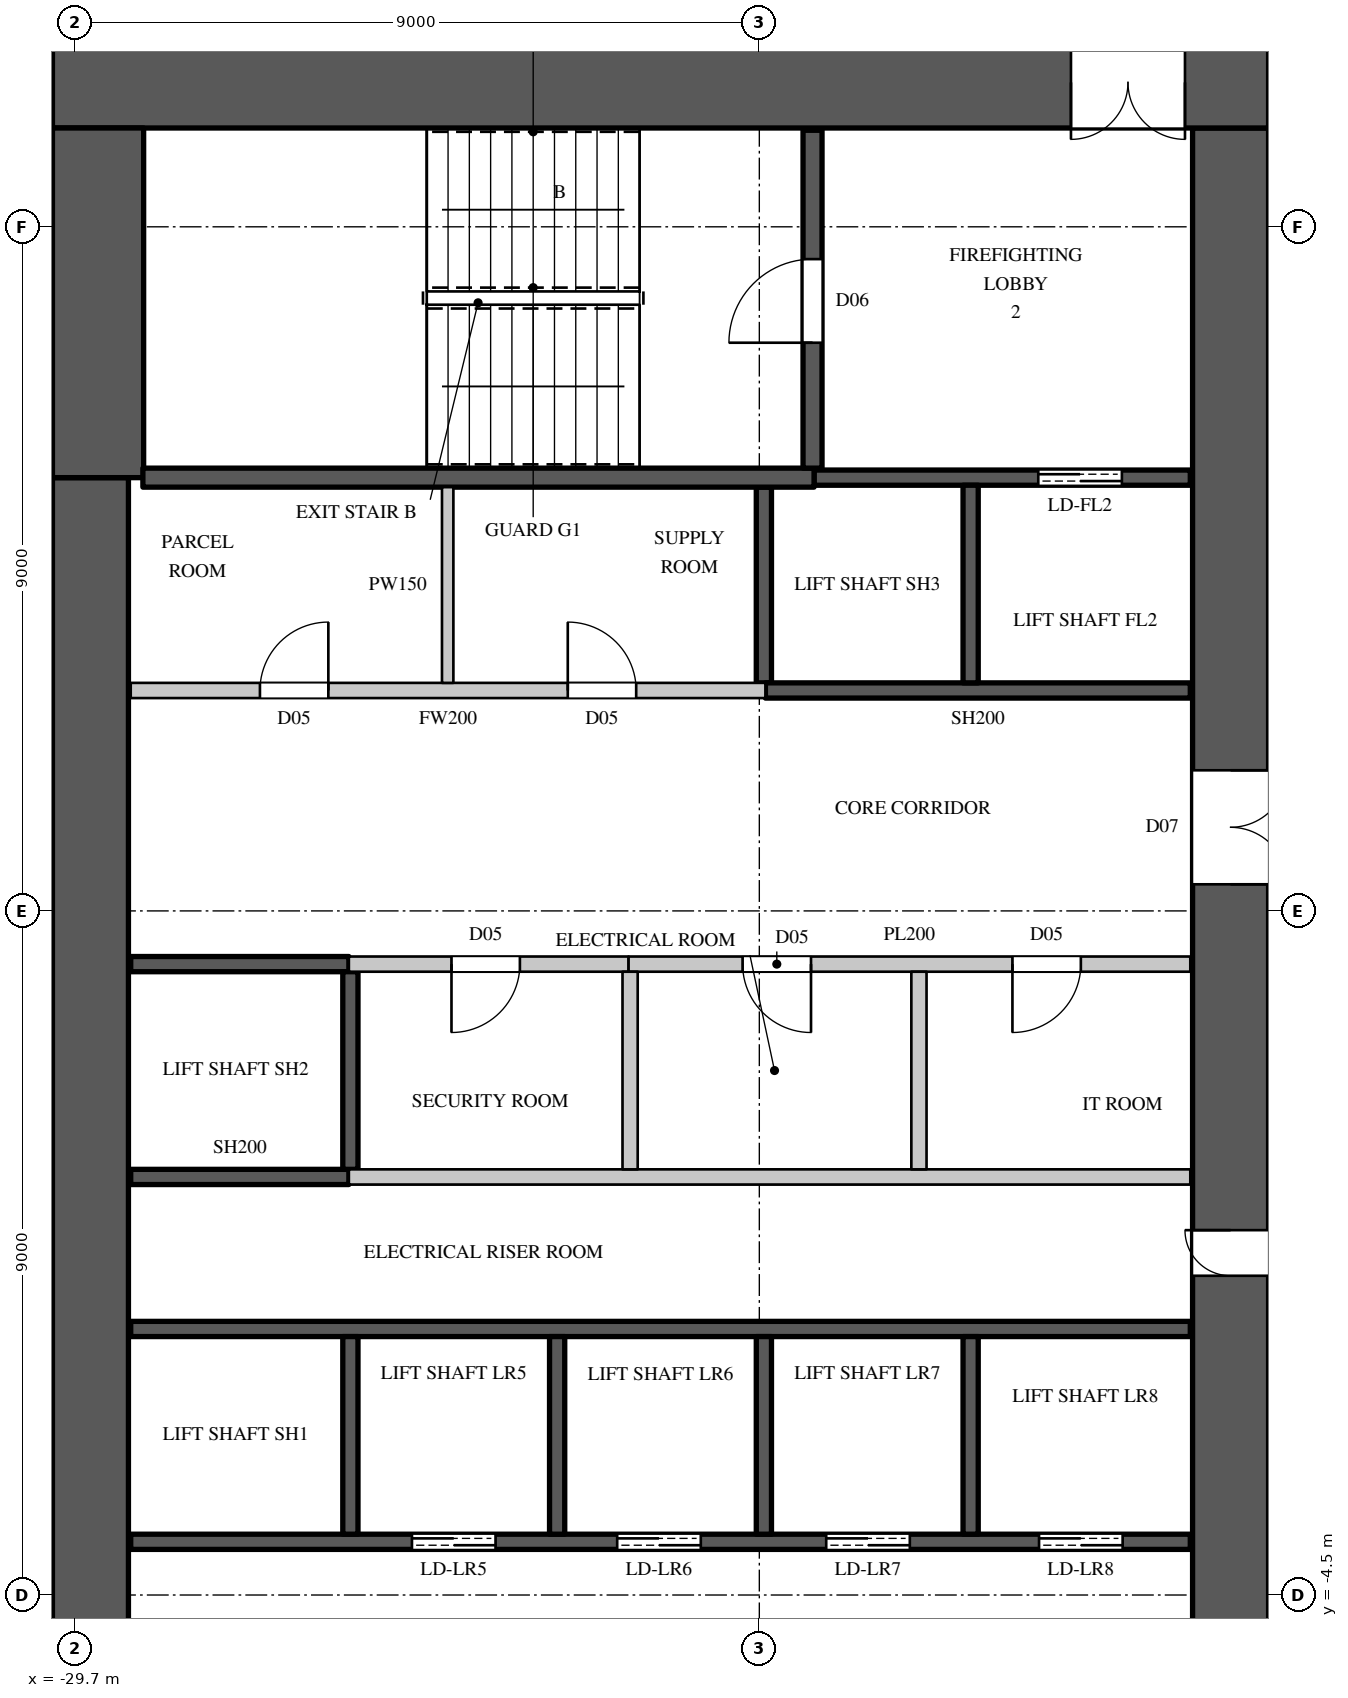
"""IFC4 building model, lengths in metres.
Left out: names, types, materials, properties, quantities, classifications, styles, units other than length and angle.
Written with IfcOpenShell. Run it as: python <this file> out.ifc"""

import sys

from ifc_helpers import new_model, si_unit, direction, frame, frame_2d, origin, place, context, subcontext, project, spatial, rectangle, extrude, element, fill, save


model = new_model("IFC4")
c1 = context("Model", 3, precision=1e-05, world=origin(), true_north=direction((0.0, 1.0)))
c2 = subcontext(c1, "Body", "Model", "MODEL_VIEW")
j1 = project(units=[si_unit("LENGTHUNIT", "METRE"), si_unit("PLANEANGLEUNIT", "RADIAN")], contexts=[c1])
p1 = place(None, origin())
s1 = spatial("IfcSite", under=j1, at=p1, CompositionType="ELEMENT")
p2 = place(p1, origin())
s2 = spatial("IfcBuilding", under=s1, at=p2, CompositionType="ELEMENT")
p3 = place(p2, frame((0.0, 0.0, 134.7)))
s3 = spatial("IfcBuildingStorey", under=s2, at=p3, CompositionType="ELEMENT", Elevation=134.7)
p4 = place(p3, frame((-30.0, 15.4, 0.0), z_axis=(0.0, 0.0, 1.0), x_axis=(1.0, 0.0, 0.0)))
e1 = element("IfcWall", 1, at=p4, inside=s3, PredefinedType="SHEAR", context=c2, shape_type="SweptSolid", body=[
    extrude(rectangle(XDim=16.0, YDim=1.2, at=frame_2d((8.0, 0.0))), origin(), (0.0, 0.0, 1.0), 3.6),
])
p5 = place(p4, frame((13.4, 0.0, 0.0)))
e2 = element("IfcOpeningElement", 2, at=p5, cuts=e1, PredefinedType="OPENING", context=c2, shape_type="SweptSolid", body=[
    extrude(rectangle(XDim=1.5, YDim=2.4, at=frame_2d((0.75, 1.2))), frame((0.0, 0.61, 0.0), z_axis=(0.0, -1.0, 0.0), x_axis=(1.0, 0.0, 0.0)), (0.0, 0.0, 1.0), 1.22),
])
p6 = place(p3, frame((-14.5, -14.8, 0.0), z_axis=(0.0, 0.0, 1.0), x_axis=(0.0, 1.0, 0.0)))
e3 = element("IfcWall", 3, at=p6, inside=s3, PredefinedType="SHEAR", context=c2, shape_type="SweptSolid", body=[
    extrude(rectangle(XDim=29.6, YDim=1.0, at=frame_2d((14.8, 0.0))), origin(), (0.0, 0.0, 1.0), 3.6),
])
p7 = place(p6, frame((8.45, 0.0, 0.0)))
e4 = element("IfcOpeningElement", 4, at=p7, cuts=e3, PredefinedType="OPENING", context=c2, shape_type="SweptSolid", body=[
    extrude(rectangle(XDim=1.5, YDim=2.4, at=frame_2d((0.75, 1.2))), frame((0.0, 0.51, 0.0), z_axis=(0.0, -1.0, 0.0), x_axis=(1.0, 0.0, 0.0)), (0.0, 0.0, 1.0), 1.02),
])
p8 = place(p6, frame((19.65, 0.0, 0.0)))
e5 = element("IfcOpeningElement", 5, at=p8, cuts=e3, PredefinedType="OPENING", context=c2, shape_type="SweptSolid", body=[
    extrude(rectangle(XDim=1.5, YDim=2.4, at=frame_2d((0.75, 1.2))), frame((0.0, 0.51, 0.0), z_axis=(0.0, -1.0, 0.0), x_axis=(1.0, 0.0, 0.0)), (0.0, 0.0, 1.0), 1.02),
])
p9 = place(p6, frame((14.5, 0.0, 0.0)))
e6 = element("IfcOpeningElement", 6, at=p9, cuts=e3, PredefinedType="OPENING", context=c2, shape_type="SweptSolid", body=[
    extrude(rectangle(XDim=0.6, YDim=2.0, at=frame_2d((0.3, 1.0))), frame((0.0, 0.51, 0.0), z_axis=(0.0, -1.0, 0.0), x_axis=(1.0, 0.0, 0.0)), (0.0, 0.0, 1.0), 1.02),
])
p10 = place(p3, frame((-29.5, -10.2, 0.0), z_axis=(0.0, 0.0, 1.0), x_axis=(0.0, 1.0, 0.0)))
e7 = element("IfcWall", 7, at=p10, inside=s3, PredefinedType="SHEAR", context=c2, shape_type="SweptSolid", body=[
    extrude(rectangle(XDim=20.4, YDim=1.0, at=frame_2d((10.2, 0.0))), origin(), (0.0, 0.0, 1.0), 3.6),
])
p11 = place(p3, frame((-29.4, 10.2, 0.0), z_axis=(0.0, 0.0, 1.0), x_axis=(0.0, 1.0, 0.0)))
e8 = element("IfcWall", 8, at=p11, inside=s3, PredefinedType="SHEAR", context=c2, shape_type="SweptSolid", body=[
    extrude(rectangle(XDim=4.6, YDim=1.2, at=frame_2d((2.3, 0.0))), origin(), (0.0, 0.0, 1.0), 3.6),
])
p12 = place(p3, frame((-28.97, 7.4, 0.0), z_axis=(0.0, 0.0, 1.0), x_axis=(1.0, 0.0, 0.0)))
e9 = element("IfcWall", 9, at=p12, inside=s3, PredefinedType="PARTITIONING", context=c2, shape_type="SweptSolid", body=[
    extrude(rectangle(XDim=8.35, YDim=0.2, at=frame_2d((4.175, 0.0))), origin(), (0.0, 0.0, 1.0), 3.3),
])
p13 = place(p12, frame((1.7, 0.0, 0.0)))
e10 = element("IfcOpeningElement", 10, at=p13, cuts=e9, PredefinedType="OPENING", context=c2, shape_type="SweptSolid", body=[
    extrude(rectangle(XDim=0.9, YDim=2.2, at=frame_2d((0.45, 1.1))), frame((0.0, 0.11, 0.0), z_axis=(0.0, -1.0, 0.0), x_axis=(1.0, 0.0, 0.0)), (0.0, 0.0, 1.0), 0.22),
])
p14 = place(p12, frame((5.75, 0.0, 0.0)))
e11 = element("IfcOpeningElement", 11, at=p14, cuts=e9, PredefinedType="OPENING", context=c2, shape_type="SweptSolid", body=[
    extrude(rectangle(XDim=0.9, YDim=2.2, at=frame_2d((0.45, 1.1))), frame((0.0, 0.11, 0.0), z_axis=(0.0, -1.0, 0.0), x_axis=(1.0, 0.0, 0.0)), (0.0, 0.0, 1.0), 0.22),
])
p15 = place(p3, frame((-26.1, 3.8, 0.0), z_axis=(0.0, 0.0, 1.0), x_axis=(1.0, 0.0, 0.0)))
e12 = element("IfcWall", 12, at=p15, inside=s3, PredefinedType="PARTITIONING", context=c2, shape_type="SweptSolid", body=[
    extrude(rectangle(XDim=3.68, YDim=0.2, at=frame_2d((1.84, 0.0))), origin(), (0.0, 0.0, 1.0), 3.3),
])
p16 = place(p15, frame((1.35, 0.0, 0.0)))
e13 = element("IfcOpeningElement", 13, at=p16, cuts=e12, PredefinedType="OPENING", context=c2, shape_type="SweptSolid", body=[
    extrude(rectangle(XDim=0.9, YDim=2.2, at=frame_2d((0.45, 1.1))), frame((0.0, 0.11, 0.0), z_axis=(0.0, -1.0, 0.0), x_axis=(1.0, 0.0, 0.0)), (0.0, 0.0, 1.0), 0.22),
])
p17 = place(p3, frame((-24.8, 7.5, 0.0), z_axis=(0.0, 0.0, 1.0), x_axis=(0.0, 1.0, 0.0)))
e14 = element("IfcWall", 14, at=p17, inside=s3, PredefinedType="PARTITIONING", context=c2, shape_type="SweptSolid", body=[
    extrude(rectangle(XDim=2.575, YDim=0.15, at=frame_2d((1.288, 0.0))), origin(), (0.0, 0.0, 1.0), 3.3),
])
p18 = place(p3, frame((-26.1, 1.0, 0.0), z_axis=(0.0, 0.0, 1.0), x_axis=(1.0, 0.0, 0.0)))
e15 = element("IfcWall", 15, at=p18, inside=s3, PredefinedType="PARTITIONING", context=c2, shape_type="SweptSolid", body=[
    extrude(rectangle(XDim=11.07, YDim=0.2, at=frame_2d((5.535, 0.0))), origin(), (0.0, 0.0, 1.0), 3.3),
])
p19 = place(p3, frame((-22.42, 3.8, 0.0), z_axis=(0.0, 0.0, 1.0), x_axis=(1.0, 0.0, 0.0)))
e16 = element("IfcWall", 16, at=p19, inside=s3, PredefinedType="PARTITIONING", context=c2, shape_type="SweptSolid", body=[
    extrude(rectangle(XDim=7.39, YDim=0.2, at=frame_2d((3.695, 0.0))), origin(), (0.0, 0.0, 1.0), 3.3),
])
p20 = place(p19, frame((1.5, 0.0, 0.0)))
e17 = element("IfcOpeningElement", 17, at=p20, cuts=e16, PredefinedType="OPENING", context=c2, shape_type="SweptSolid", body=[
    extrude(rectangle(XDim=0.9, YDim=2.2, at=frame_2d((0.45, 1.1))), frame((0.0, 0.11, 0.0), z_axis=(0.0, -1.0, 0.0), x_axis=(1.0, 0.0, 0.0)), (0.0, 0.0, 1.0), 0.22),
])
p21 = place(p19, frame((5.05, 0.0, 0.0)))
e18 = element("IfcOpeningElement", 18, at=p21, cuts=e16, PredefinedType="OPENING", context=c2, shape_type="SweptSolid", body=[
    extrude(rectangle(XDim=0.9, YDim=2.2, at=frame_2d((0.45, 1.1))), frame((0.0, 0.11, 0.0), z_axis=(0.0, -1.0, 0.0), x_axis=(1.0, 0.0, 0.0)), (0.0, 0.0, 1.0), 0.22),
])
for number, where, z_axis, x_axis in (
    (19, (-22.4, 1.1, 0.0), (0.0, 0.0, 1.0), (0.0, 1.0, 0.0)),
    (20, (-18.6, 1.1, 0.0), (0.0, 0.0, 1.0), (0.0, 1.0, 0.0)),
):
    element("IfcWall", number, at=place(p3, frame(where, z_axis=z_axis, x_axis=x_axis)), inside=s3, PredefinedType="PARTITIONING", context=c2, shape_type="SweptSolid", body=[
        extrude(rectangle(XDim=2.6, YDim=0.2, at=frame_2d((1.3, 0.0))), origin(), (0.0, 0.0, 1.0), 3.3),
    ])
p22 = place(p3, frame((-28.97, -3.8, 0.0), z_axis=(0.0, 0.0, 1.0), x_axis=(1.0, 0.0, 0.0)))
e21 = element("IfcWall", 21, at=p22, inside=s3, PredefinedType="SHEAR", context=c2, shape_type="SweptSolid", body=[
    extrude(rectangle(XDim=13.94, YDim=0.2, at=frame_2d((6.97, 0.0))), origin(), (0.0, 0.0, 1.0), 3.3),
])
p23 = place(p22, frame((3.7, 0.0, 0.0)))
e22 = element("IfcOpeningElement", 22, at=p23, cuts=e21, PredefinedType="OPENING", context=c2, shape_type="SweptSolid", body=[
    extrude(rectangle(XDim=1.1, YDim=2.2, at=frame_2d((0.55, 1.1))), frame((0.0, 0.11, 0.0), z_axis=(0.0, -1.0, 0.0), x_axis=(1.0, 0.0, 0.0)), (0.0, 0.0, 1.0), 0.22),
])
p24 = place(p22, frame((6.4, 0.0, 0.0)))
e23 = element("IfcOpeningElement", 23, at=p24, cuts=e21, PredefinedType="OPENING", context=c2, shape_type="SweptSolid", body=[
    extrude(rectangle(XDim=1.1, YDim=2.2, at=frame_2d((0.55, 1.1))), frame((0.0, 0.11, 0.0), z_axis=(0.0, -1.0, 0.0), x_axis=(1.0, 0.0, 0.0)), (0.0, 0.0, 1.0), 0.22),
])
p25 = place(p22, frame((9.15, 0.0, 0.0)))
e24 = element("IfcOpeningElement", 24, at=p25, cuts=e21, PredefinedType="OPENING", context=c2, shape_type="SweptSolid", body=[
    extrude(rectangle(XDim=1.1, YDim=2.2, at=frame_2d((0.55, 1.1))), frame((0.0, 0.11, 0.0), z_axis=(0.0, -1.0, 0.0), x_axis=(1.0, 0.0, 0.0)), (0.0, 0.0, 1.0), 0.22),
])
p26 = place(p22, frame((11.95, 0.0, 0.0)))
e25 = element("IfcOpeningElement", 25, at=p26, cuts=e21, PredefinedType="OPENING", context=c2, shape_type="SweptSolid", body=[
    extrude(rectangle(XDim=1.1, YDim=2.2, at=frame_2d((0.55, 1.1))), frame((0.0, 0.11, 0.0), z_axis=(0.0, -1.0, 0.0), x_axis=(1.0, 0.0, 0.0)), (0.0, 0.0, 1.0), 0.22),
])
p27 = place(p3, frame((-28.97, -1.0, 0.0), z_axis=(0.0, 0.0, 1.0), x_axis=(1.0, 0.0, 0.0)))
e26 = element("IfcWall", 26, at=p27, inside=s3, PredefinedType="SHEAR", context=c2, shape_type="SweptSolid", body=[
    extrude(rectangle(XDim=13.94, YDim=0.2, at=frame_2d((6.97, 0.0))), origin(), (0.0, 0.0, 1.0), 3.3),
])
for number, where, z_axis, x_axis in (
    (27, (-28.97, 1.0, 0.0), (0.0, 0.0, 1.0), (1.0, 0.0, 0.0)),
    (28, (-28.97, 3.8, 0.0), (0.0, 0.0, 1.0), (1.0, 0.0, 0.0)),
):
    element("IfcWall", number, at=place(p3, frame(where, z_axis=z_axis, x_axis=x_axis)), inside=s3, PredefinedType="SHEAR", context=c2, shape_type="SweptSolid", body=[
        extrude(rectangle(XDim=2.87, YDim=0.2, at=frame_2d((1.435, 0.0))), origin(), (0.0, 0.0, 1.0), 3.3),
    ])
p28 = place(p3, frame((-26.08, -3.7, 0.0), z_axis=(0.0, 0.0, 1.0), x_axis=(0.0, 1.0, 0.0)))
e29 = element("IfcWall", 29, at=p28, inside=s3, PredefinedType="SHEAR", context=c2, shape_type="SweptSolid", body=[
    extrude(rectangle(XDim=2.6, YDim=0.2, at=frame_2d((1.3, 0.0))), origin(), (0.0, 0.0, 1.0), 3.6),
])
p29 = place(p3, frame((-26.08, 1.1, 0.0), z_axis=(0.0, 0.0, 1.0), x_axis=(0.0, 1.0, 0.0)))
e30 = element("IfcWall", 30, at=p29, inside=s3, PredefinedType="SHEAR", context=c2, shape_type="SweptSolid", body=[
    extrude(rectangle(XDim=2.6, YDim=0.2, at=frame_2d((1.3, 0.0))), origin(), (0.0, 0.0, 1.0), 3.3),
])
for number, where, z_axis, x_axis in (
    (31, (-23.36, -3.7, 0.0), (0.0, 0.0, 1.0), (0.0, 1.0, 0.0)),
    (32, (-20.64, -3.7, 0.0), (0.0, 0.0, 1.0), (0.0, 1.0, 0.0)),
):
    element("IfcWall", number, at=place(p3, frame(where, z_axis=z_axis, x_axis=x_axis)), inside=s3, PredefinedType="SHEAR", context=c2, shape_type="SweptSolid", body=[
        extrude(rectangle(XDim=2.6, YDim=0.2, at=frame_2d((1.3, 0.0))), origin(), (0.0, 0.0, 1.0), 3.6),
    ])
p30 = place(p3, frame((-20.64, 7.5, 0.0), z_axis=(0.0, 0.0, 1.0), x_axis=(0.0, 1.0, 0.0)))
e33 = element("IfcWall", 33, at=p30, inside=s3, PredefinedType="SHEAR", context=c2, shape_type="SweptSolid", body=[
    extrude(rectangle(XDim=2.575, YDim=0.2, at=frame_2d((1.288, 0.0))), origin(), (0.0, 0.0, 1.0), 3.3),
])
p31 = place(p3, frame((-20.62, 7.4, 0.0), z_axis=(0.0, 0.0, 1.0), x_axis=(1.0, 0.0, 0.0)))
e34 = element("IfcWall", 34, at=p31, inside=s3, PredefinedType="SHEAR", context=c2, shape_type="SweptSolid", body=[
    extrude(rectangle(XDim=5.59, YDim=0.2, at=frame_2d((2.795, 0.0))), origin(), (0.0, 0.0, 1.0), 3.3),
])
p32 = place(p3, frame((-19.98, 10.2, 0.0), z_axis=(0.0, 0.0, 1.0), x_axis=(1.0, 0.0, 0.0)))
e35 = element("IfcWall", 35, at=p32, inside=s3, PredefinedType="SHEAR", context=c2, shape_type="SweptSolid", body=[
    extrude(rectangle(XDim=4.95, YDim=0.2, at=frame_2d((2.475, 0.0))), origin(), (0.0, 0.0, 1.0), 3.3),
])
p33 = place(p32, frame((2.95, 0.0, 0.0)))
e36 = element("IfcOpeningElement", 36, at=p33, cuts=e35, PredefinedType="OPENING", context=c2, shape_type="SweptSolid", body=[
    extrude(rectangle(XDim=1.1, YDim=2.2, at=frame_2d((0.55, 1.1))), frame((0.0, 0.11, 0.0), z_axis=(0.0, -1.0, 0.0), x_axis=(1.0, 0.0, 0.0)), (0.0, 0.0, 1.0), 0.22),
])
p34 = place(p3, frame((-17.92, -3.7, 0.0), z_axis=(0.0, 0.0, 1.0), x_axis=(0.0, 1.0, 0.0)))
e37 = element("IfcWall", 37, at=p34, inside=s3, PredefinedType="SHEAR", context=c2, shape_type="SweptSolid", body=[
    extrude(rectangle(XDim=2.6, YDim=0.2, at=frame_2d((1.3, 0.0))), origin(), (0.0, 0.0, 1.0), 3.6),
])
p35 = place(p3, frame((-17.92, 7.5, 0.0), z_axis=(0.0, 0.0, 1.0), x_axis=(0.0, 1.0, 0.0)))
e38 = element("IfcWall", 38, at=p35, inside=s3, PredefinedType="SHEAR", context=c2, shape_type="SweptSolid", body=[
    extrude(rectangle(XDim=2.6, YDim=0.2, at=frame_2d((1.3, 0.0))), origin(), (0.0, 0.0, 1.0), 3.6),
])
p36 = place(p3, frame((-28.81, 10.2, 0.0), z_axis=(0.0, 0.0, 1.0), x_axis=(1.0, 0.0, 0.0)))
e39 = element("IfcWall", 39, at=p36, inside=s3, PredefinedType="SHEAR", context=c2, shape_type="SweptSolid", body=[
    extrude(rectangle(XDim=8.83, YDim=0.25, at=frame_2d((4.415, 0.0))), origin(), (0.0, 0.0, 1.0), 3.3),
])
p37 = place(p3, frame((-20.0, 10.325, 0.0), z_axis=(0.0, 0.0, 1.0), x_axis=(0.0, 1.0, 0.0)))
e40 = element("IfcWall", 40, at=p37, inside=s3, PredefinedType="SHEAR", context=c2, shape_type="SweptSolid", body=[
    extrude(rectangle(XDim=4.445, YDim=0.25, at=frame_2d((2.223, 0.0))), origin(), (0.0, 0.0, 1.0), 3.3),
])
p38 = place(p37, frame((1.65, 0.0, 0.0)))
e41 = element("IfcOpeningElement", 41, at=p38, cuts=e40, PredefinedType="OPENING", context=c2, shape_type="SweptSolid", body=[
    extrude(rectangle(XDim=1.1, YDim=2.2, at=frame_2d((0.55, 1.1))), frame((0.0, 0.135, 0.0), z_axis=(0.0, -1.0, 0.0), x_axis=(1.0, 0.0, 0.0)), (0.0, 0.0, 1.0), 0.27),
])
p39 = place(p38, origin())
e42 = element("IfcDoor", 42, at=p39, inside=s3, OperationType="SINGLE_SWING_LEFT", PredefinedType="DOOR", context=c2, shape_type="SweptSolid", body=[
    extrude(rectangle(XDim=1.1, YDim=2.2, at=frame_2d((0.55, 1.1))), frame((0.0, 0.025, 0.0), z_axis=(0.0, -1.0, 0.0), x_axis=(1.0, 0.0, 0.0)), (0.0, 0.0, 1.0), 0.05),
])
fill(e41, e42)
p40 = place(p16, origin())
e43 = element("IfcDoor", 43, at=p40, inside=s3, OperationType="SINGLE_SWING_RIGHT", PredefinedType="DOOR", context=c2, shape_type="SweptSolid", body=[
    extrude(rectangle(XDim=0.9, YDim=2.2, at=frame_2d((0.45, 1.1))), frame((0.0, 0.025, 0.0), z_axis=(0.0, -1.0, 0.0), x_axis=(1.0, 0.0, 0.0)), (0.0, 0.0, 1.0), 0.05),
])
fill(e13, e43)
p41 = place(p20, origin())
e44 = element("IfcDoor", 44, at=p41, inside=s3, OperationType="SINGLE_SWING_LEFT", PredefinedType="DOOR", context=c2, shape_type="SweptSolid", body=[
    extrude(rectangle(XDim=0.9, YDim=2.2, at=frame_2d((0.45, 1.1))), frame((0.0, 0.025, 0.0), z_axis=(0.0, -1.0, 0.0), x_axis=(1.0, 0.0, 0.0)), (0.0, 0.0, 1.0), 0.05),
])
fill(e17, e44)
p42 = place(p21, origin())
e45 = element("IfcDoor", 45, at=p42, inside=s3, OperationType="SINGLE_SWING_RIGHT", PredefinedType="DOOR", context=c2, shape_type="SweptSolid", body=[
    extrude(rectangle(XDim=0.9, YDim=2.2, at=frame_2d((0.45, 1.1))), frame((0.0, 0.025, 0.0), z_axis=(0.0, -1.0, 0.0), x_axis=(1.0, 0.0, 0.0)), (0.0, 0.0, 1.0), 0.05),
])
fill(e18, e45)
p43 = place(p13, origin())
e46 = element("IfcDoor", 46, at=p43, inside=s3, OperationType="SINGLE_SWING_RIGHT", PredefinedType="DOOR", context=c2, shape_type="SweptSolid", body=[
    extrude(rectangle(XDim=0.9, YDim=2.2, at=frame_2d((0.45, 1.1))), frame((0.0, 0.025, 0.0), z_axis=(0.0, -1.0, 0.0), x_axis=(1.0, 0.0, 0.0)), (0.0, 0.0, 1.0), 0.05),
])
fill(e10, e46)
p44 = place(p14, origin())
e47 = element("IfcDoor", 47, at=p44, inside=s3, OperationType="SINGLE_SWING_LEFT", PredefinedType="DOOR", context=c2, shape_type="SweptSolid", body=[
    extrude(rectangle(XDim=0.9, YDim=2.2, at=frame_2d((0.45, 1.1))), frame((0.0, 0.025, 0.0), z_axis=(0.0, -1.0, 0.0), x_axis=(1.0, 0.0, 0.0)), (0.0, 0.0, 1.0), 0.05),
])
fill(e11, e47)
p45 = place(p23, origin())
e48 = element("IfcDoor", 48, at=p45, inside=s3, OperationType="DOUBLE_DOOR_SLIDING", PredefinedType="DOOR", context=c2, shape_type="SweptSolid", body=[
    extrude(rectangle(XDim=1.1, YDim=2.2, at=frame_2d((0.55, 1.1))), frame((0.0, 0.025, 0.0), z_axis=(0.0, -1.0, 0.0), x_axis=(1.0, 0.0, 0.0)), (0.0, 0.0, 1.0), 0.05),
])
fill(e22, e48)
p46 = place(p24, origin())
e49 = element("IfcDoor", 49, at=p46, inside=s3, OperationType="DOUBLE_DOOR_SLIDING", PredefinedType="DOOR", context=c2, shape_type="SweptSolid", body=[
    extrude(rectangle(XDim=1.1, YDim=2.2, at=frame_2d((0.55, 1.1))), frame((0.0, 0.025, 0.0), z_axis=(0.0, -1.0, 0.0), x_axis=(1.0, 0.0, 0.0)), (0.0, 0.0, 1.0), 0.05),
])
fill(e23, e49)
p47 = place(p25, origin())
e50 = element("IfcDoor", 50, at=p47, inside=s3, OperationType="DOUBLE_DOOR_SLIDING", PredefinedType="DOOR", context=c2, shape_type="SweptSolid", body=[
    extrude(rectangle(XDim=1.1, YDim=2.2, at=frame_2d((0.55, 1.1))), frame((0.0, 0.025, 0.0), z_axis=(0.0, -1.0, 0.0), x_axis=(1.0, 0.0, 0.0)), (0.0, 0.0, 1.0), 0.05),
])
fill(e24, e50)
p48 = place(p26, origin())
e51 = element("IfcDoor", 51, at=p48, inside=s3, OperationType="DOUBLE_DOOR_SLIDING", PredefinedType="DOOR", context=c2, shape_type="SweptSolid", body=[
    extrude(rectangle(XDim=1.1, YDim=2.2, at=frame_2d((0.55, 1.1))), frame((0.0, 0.025, 0.0), z_axis=(0.0, -1.0, 0.0), x_axis=(1.0, 0.0, 0.0)), (0.0, 0.0, 1.0), 0.05),
])
fill(e25, e51)
p49 = place(p33, origin())
e52 = element("IfcDoor", 52, at=p49, inside=s3, OperationType="DOUBLE_DOOR_SLIDING", PredefinedType="DOOR", context=c2, shape_type="SweptSolid", body=[
    extrude(rectangle(XDim=1.1, YDim=2.2, at=frame_2d((0.55, 1.1))), frame((0.0, 0.025, 0.0), z_axis=(0.0, -1.0, 0.0), x_axis=(1.0, 0.0, 0.0)), (0.0, 0.0, 1.0), 0.05),
])
fill(e36, e52)
p50 = place(p5, origin())
e53 = element("IfcDoor", 53, at=p50, inside=s3, OperationType="DOUBLE_DOOR_SINGLE_SWING", PredefinedType="DOOR", context=c2, shape_type="SweptSolid", body=[
    extrude(rectangle(XDim=1.5, YDim=2.4, at=frame_2d((0.75, 1.2))), frame((0.0, 0.025, 0.0), z_axis=(0.0, -1.0, 0.0), x_axis=(1.0, 0.0, 0.0)), (0.0, 0.0, 1.0), 0.05),
])
fill(e2, e53)
p51 = place(p8, origin())
e54 = element("IfcDoor", 54, at=p51, inside=s3, OperationType="DOUBLE_DOOR_SINGLE_SWING", PredefinedType="DOOR", context=c2, shape_type="SweptSolid", body=[
    extrude(rectangle(XDim=1.5, YDim=2.4, at=frame_2d((0.75, 1.2))), frame((0.0, -0.445, 0.0), z_axis=(0.0, -1.0, 0.0), x_axis=(1.0, 0.0, 0.0)), (0.0, 0.0, 1.0), 0.05),
])
fill(e5, e54)
p52 = place(p9, origin())
e55 = element("IfcDoor", 55, at=p52, inside=s3, OperationType="SINGLE_SWING_RIGHT", PredefinedType="DOOR", context=c2, shape_type="SweptSolid", body=[
    extrude(rectangle(XDim=0.6, YDim=2.0, at=frame_2d((0.3, 1.0))), frame((0.0, 0.495, 0.0), z_axis=(0.0, -1.0, 0.0), x_axis=(1.0, 0.0, 0.0)), (0.0, 0.0, 1.0), 0.05),
])
fill(e6, e55)
save(model, sys.argv[1])
